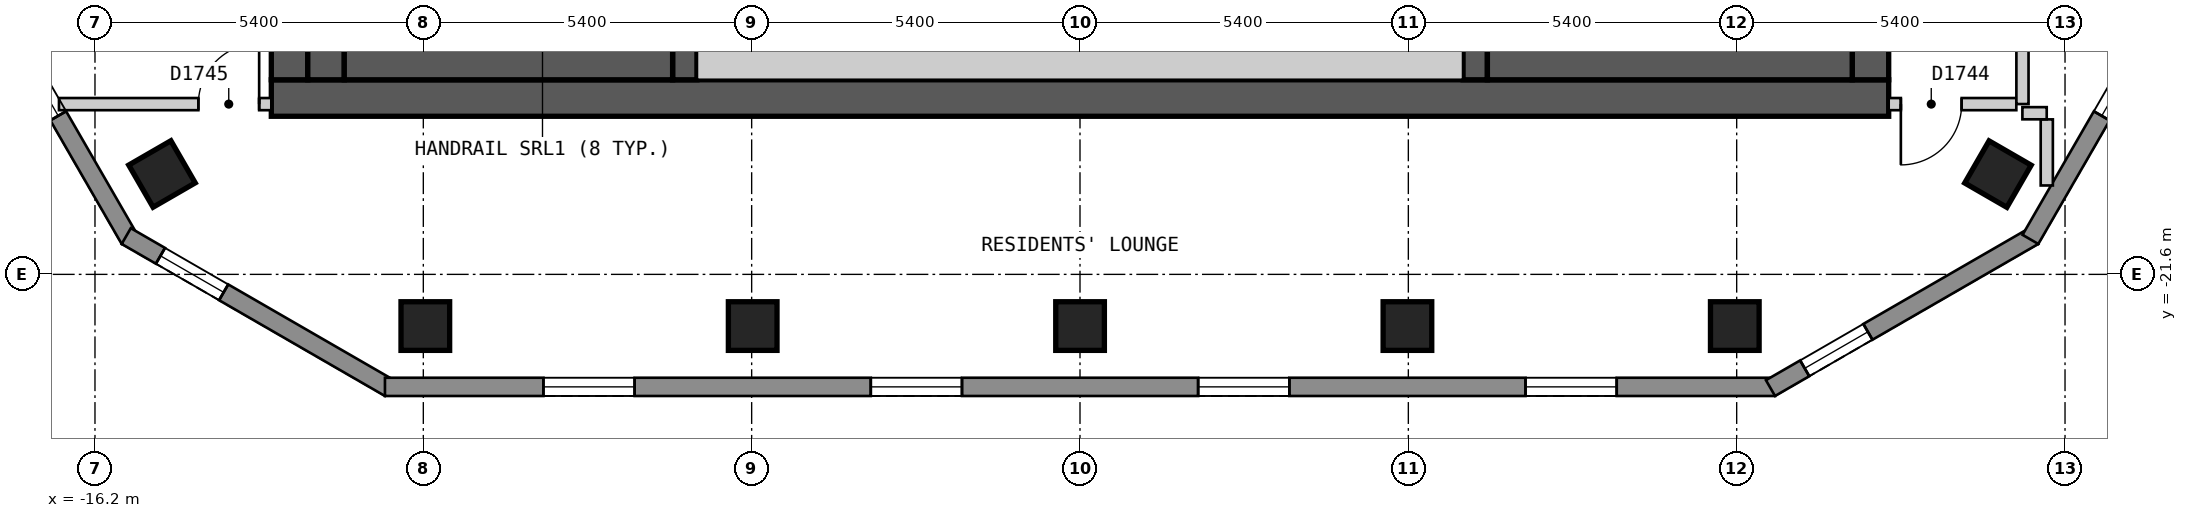
"""IFC4 building model, lengths in metres.
Left out: names, types, materials, properties, quantities, classifications, styles, units other than length and angle.
Written with IfcOpenShell. Run it as: python <this file> out.ifc"""

import sys

from ifc_helpers import new_model, si_unit, direction, frame, frame_2d, origin, origin_2d, place, context, subcontext, project, spatial, polyline, rectangle, outline, extrude, element, fill, save


model = new_model("IFC4")
c1 = context("Model", 3, precision=1e-05, world=origin(), true_north=direction((0.0, 1.0)))
c2 = subcontext(c1, "Body", "Model", "MODEL_VIEW")
j1 = project(units=[si_unit("LENGTHUNIT", "METRE"), si_unit("PLANEANGLEUNIT", "RADIAN")], contexts=[c1])
p1 = place(None, origin())
s1 = spatial("IfcSite", under=j1, at=p1, CompositionType="ELEMENT")
p2 = place(p1, origin())
s2 = spatial("IfcBuilding", under=s1, at=p2, CompositionType="ELEMENT")
p3 = place(p2, frame((0.0, 0.0, 181.2)))
s3 = spatial("IfcBuildingStorey", under=s2, at=p3, CompositionType="ELEMENT", Elevation=181.2)
for number, where, z_axis, x_axis in (
    (1, (-15.098, -19.949, 0.0), (0.0, 0.0, 1.0), (0.5, -0.866, 0.0)),
    (2, (-10.767, -22.45, 0.0), (0.0, 0.0, 1.0), (1.0, 0.0, 0.0)),
    (3, (-5.383, -22.45, 0.0), (0.0, 0.0, 1.0), (1.0, 0.0, 0.0)),
    (4, (0.001, -22.45, 0.0), (0.0, 0.0, 1.0), (1.0, 0.0, 0.0)),
    (5, (5.385, -22.45, 0.0), (0.0, 0.0, 1.0), (1.0, 0.0, 0.0)),
    (6, (10.769, -22.45, 0.0), (0.0, 0.0, 1.0), (1.0, 0.0, 0.0)),
    (7, (15.097, -19.951, 0.0), (0.0, 0.0, 1.0), (0.5, 0.866, 0.0)),
):
    element("IfcColumn", number, at=place(p3, frame(where, z_axis=z_axis, x_axis=x_axis)), inside=s3, PredefinedType="COLUMN", context=c2, shape_type="SweptSolid", body=[
        extrude(rectangle(XDim=0.8, YDim=0.8, at=origin_2d()), origin(), (0.0, 0.0, 1.0), 3.0),
    ])
p4 = place(p3, frame((-13.3, -18.7, 0.0), z_axis=(0.0, 0.0, 1.0), x_axis=(1.0, 0.0, 0.0)))
e8 = element("IfcWall", 8, at=p4, inside=s3, PredefinedType="SHEAR", context=c2, shape_type="SweptSolid", body=[
    extrude(rectangle(XDim=26.6, YDim=0.6, at=frame_2d((13.3, 0.0))), origin(), (0.0, 0.0, 1.0), 2.7),
])
p5 = place(p3, frame((-13.0, -18.4, 0.0), z_axis=(0.0, 0.0, 1.0), x_axis=(0.0, 1.0, 0.0)))
e9 = element("IfcWall", 9, at=p5, inside=s3, PredefinedType="SHEAR", context=c2, shape_type="SweptSolid", body=[
    extrude(rectangle(XDim=12.8, YDim=0.6, at=frame_2d((6.4, 0.0))), origin(), (0.0, 0.0, 1.0), 2.7),
])
p6 = place(p5, frame((4.2, 0.0, 0.0)))
e10 = element("IfcOpeningElement", 10, at=p6, cuts=e9, PredefinedType="OPENING", context=c2, shape_type="SweptSolid", body=[
    extrude(rectangle(XDim=1.2, YDim=2.1, at=frame_2d((0.6, 1.05))), frame((0.0, 0.31, 0.0), z_axis=(0.0, -1.0, 0.0), x_axis=(1.0, 0.0, 0.0)), (0.0, 0.0, 1.0), 0.62),
])
p7 = place(p3, frame((13.0, -18.4, 0.0), z_axis=(0.0, 0.0, 1.0), x_axis=(0.0, 1.0, 0.0)))
e11 = element("IfcWall", 11, at=p7, inside=s3, PredefinedType="SHEAR", context=c2, shape_type="SweptSolid", body=[
    extrude(rectangle(XDim=12.8, YDim=0.6, at=frame_2d((6.4, 0.0))), origin(), (0.0, 0.0, 1.0), 2.7),
])
for number, where, z_axis, x_axis in (
    (12, (-6.5, -18.4, 0.0), (0.0, 0.0, 1.0), (0.0, 1.0, 0.0)),
    (13, (6.5, -18.4, 0.0), (0.0, 0.0, 1.0), (0.0, 1.0, 0.0)),
):
    element("IfcWall", number, at=place(p3, frame(where, z_axis=z_axis, x_axis=x_axis)), inside=s3, PredefinedType="SHEAR", context=c2, shape_type="SweptSolid", body=[
        extrude(rectangle(XDim=3.55, YDim=0.4, at=frame_2d((1.775, 0.0))), origin(), (0.0, 0.0, 1.0), 2.7),
    ])
p8 = place(p3, frame((-26.024, -3.025, 0.0), z_axis=(0.0, 0.0, 1.0), x_axis=(0.500018670445, -0.86601462413, 0.0)))
e14 = element("IfcWall", 14, at=p8, inside=s3, PredefinedType="SOLIDWALL", context=c2, shape_type="SweptSolid", body=[
    extrude(outline(polyline([(0.0, -0.15), (20.785, -0.15), (20.705, 0.15), (0.08, 0.15), (0.0, -0.15)])), origin(), (0.0, 0.0, 1.0), 2.7),
])
p9 = place(p8, frame((2.346, 0.0, 0.15)))
e15 = element("IfcOpeningElement", 15, at=p9, cuts=e14, PredefinedType="OPENING", context=c2, shape_type="SweptSolid", body=[
    extrude(rectangle(XDim=1.5, YDim=2.1, at=frame_2d((0.75, 1.05))), frame((0.0, 0.16, 0.0), z_axis=(0.0, -1.0, 0.0), x_axis=(1.0, 0.0, 0.0)), (0.0, 0.0, 1.0), 0.32),
])
p10 = place(p8, frame((7.21, 0.0, 0.15)))
e16 = element("IfcOpeningElement", 16, at=p10, cuts=e14, PredefinedType="OPENING", context=c2, shape_type="SweptSolid", body=[
    extrude(rectangle(XDim=1.5, YDim=2.1, at=frame_2d((0.75, 1.05))), frame((0.0, 0.16, 0.0), z_axis=(0.0, -1.0, 0.0), x_axis=(1.0, 0.0, 0.0)), (0.0, 0.0, 1.0), 0.32),
])
p11 = place(p8, frame((12.073, 0.0, 0.15)))
e17 = element("IfcOpeningElement", 17, at=p11, cuts=e14, PredefinedType="OPENING", context=c2, shape_type="SweptSolid", body=[
    extrude(rectangle(XDim=1.5, YDim=2.1, at=frame_2d((0.75, 1.05))), frame((0.0, 0.16, 0.0), z_axis=(0.0, -1.0, 0.0), x_axis=(1.0, 0.0, 0.0)), (0.0, 0.0, 1.0), 0.32),
])
p12 = place(p8, frame((16.938, 0.0, 0.15)))
e18 = element("IfcOpeningElement", 18, at=p12, cuts=e14, PredefinedType="OPENING", context=c2, shape_type="SweptSolid", body=[
    extrude(rectangle(XDim=1.5, YDim=2.1, at=frame_2d((0.75, 1.05))), frame((0.0, 0.16, 0.0), z_axis=(0.0, -1.0, 0.0), x_axis=(1.0, 0.0, 0.0)), (0.0, 0.0, 1.0), 0.32),
])
p13 = place(p3, frame((-15.686, -20.97, 0.0), z_axis=(0.0, 0.0, 1.0), x_axis=(0.866022959057, -0.500004234368, 0.0)))
e19 = element("IfcWall", 19, at=p13, inside=s3, PredefinedType="SOLIDWALL", context=c2, shape_type="SweptSolid", body=[
    extrude(outline(polyline([(0.0, -0.15), (5.0, -0.15), (4.92, 0.15), (0.08, 0.15), (0.0, -0.15)])), origin(), (0.0, 0.0, 1.0), 2.7),
])
p14 = place(p13, frame((0.65, 0.0, 0.15)))
e20 = element("IfcOpeningElement", 20, at=p14, cuts=e19, PredefinedType="OPENING", context=c2, shape_type="SweptSolid", body=[
    extrude(rectangle(XDim=1.2, YDim=2.1, at=frame_2d((0.6, 1.05))), frame((0.0, 0.16, 0.0), z_axis=(0.0, -1.0, 0.0), x_axis=(1.0, 0.0, 0.0)), (0.0, 0.0, 1.0), 0.32),
])
p15 = place(p3, frame((-11.431, -23.45, 0.0), z_axis=(0.0, 0.0, 1.0), x_axis=(1.0, 0.0, 0.0)))
e21 = element("IfcWall", 21, at=p15, inside=s3, PredefinedType="SOLIDWALL", context=c2, shape_type="SweptSolid", body=[
    extrude(outline(polyline([(0.0, -0.15), (22.862, -0.15), (22.781, 0.15), (0.08, 0.15), (0.0, -0.15)])), origin(), (0.0, 0.0, 1.0), 2.7),
])
p16 = place(p15, frame((2.606, 0.0, 0.15)))
e22 = element("IfcOpeningElement", 22, at=p16, cuts=e21, PredefinedType="OPENING", context=c2, shape_type="SweptSolid", body=[
    extrude(rectangle(XDim=1.5, YDim=2.1, at=frame_2d((0.75, 1.05))), frame((0.0, 0.16, 0.0), z_axis=(0.0, -1.0, 0.0), x_axis=(1.0, 0.0, 0.0)), (0.0, 0.0, 1.0), 0.32),
])
p17 = place(p15, frame((7.99, 0.0, 0.15)))
e23 = element("IfcOpeningElement", 23, at=p17, cuts=e21, PredefinedType="OPENING", context=c2, shape_type="SweptSolid", body=[
    extrude(rectangle(XDim=1.5, YDim=2.1, at=frame_2d((0.75, 1.05))), frame((0.0, 0.16, 0.0), z_axis=(0.0, -1.0, 0.0), x_axis=(1.0, 0.0, 0.0)), (0.0, 0.0, 1.0), 0.32),
])
p18 = place(p15, frame((13.374, 0.0, 0.15)))
e24 = element("IfcOpeningElement", 24, at=p18, cuts=e21, PredefinedType="OPENING", context=c2, shape_type="SweptSolid", body=[
    extrude(rectangle(XDim=1.5, YDim=2.1, at=frame_2d((0.75, 1.05))), frame((0.0, 0.16, 0.0), z_axis=(0.0, -1.0, 0.0), x_axis=(1.0, 0.0, 0.0)), (0.0, 0.0, 1.0), 0.32),
])
p19 = place(p15, frame((18.758, 0.0, 0.15)))
e25 = element("IfcOpeningElement", 25, at=p19, cuts=e21, PredefinedType="OPENING", context=c2, shape_type="SweptSolid", body=[
    extrude(rectangle(XDim=1.5, YDim=2.1, at=frame_2d((0.75, 1.05))), frame((0.0, 0.16, 0.0), z_axis=(0.0, -1.0, 0.0), x_axis=(1.0, 0.0, 0.0)), (0.0, 0.0, 1.0), 0.32),
])
p20 = place(p3, frame((11.356, -23.47, 0.0), z_axis=(0.0, 0.0, 1.0), x_axis=(0.866022959057, 0.500004234368, 0.0)))
e26 = element("IfcWall", 26, at=p20, inside=s3, PredefinedType="SOLIDWALL", context=c2, shape_type="SweptSolid", body=[
    extrude(outline(polyline([(0.0, -0.15), (5.0, -0.15), (4.92, 0.15), (0.08, 0.15), (0.0, -0.15)])), origin(), (0.0, 0.0, 1.0), 2.7),
])
p21 = place(p20, frame((0.65, 0.0, 0.15)))
e27 = element("IfcOpeningElement", 27, at=p21, cuts=e26, PredefinedType="OPENING", context=c2, shape_type="SweptSolid", body=[
    extrude(rectangle(XDim=1.2, YDim=2.1, at=frame_2d((0.6, 1.05))), frame((0.0, 0.16, 0.0), z_axis=(0.0, -1.0, 0.0), x_axis=(1.0, 0.0, 0.0)), (0.0, 0.0, 1.0), 0.32),
])
p22 = place(p3, frame((15.631, -21.025, 0.0), z_axis=(0.0, 0.0, 1.0), x_axis=(0.500018670445, 0.86601462413, 0.0)))
e28 = element("IfcWall", 28, at=p22, inside=s3, PredefinedType="SOLIDWALL", context=c2, shape_type="SweptSolid", body=[
    extrude(outline(polyline([(0.0, -0.15), (20.785, -0.15), (20.705, 0.15), (0.08, 0.15), (0.0, -0.15)])), origin(), (0.0, 0.0, 1.0), 2.7),
])
p23 = place(p22, frame((2.346, 0.0, 0.15)))
e29 = element("IfcOpeningElement", 29, at=p23, cuts=e28, PredefinedType="OPENING", context=c2, shape_type="SweptSolid", body=[
    extrude(rectangle(XDim=1.5, YDim=2.1, at=frame_2d((0.75, 1.05))), frame((0.0, 0.16, 0.0), z_axis=(0.0, -1.0, 0.0), x_axis=(1.0, 0.0, 0.0)), (0.0, 0.0, 1.0), 0.32),
])
p24 = place(p22, frame((7.21, 0.0, 0.15)))
e30 = element("IfcOpeningElement", 30, at=p24, cuts=e28, PredefinedType="OPENING", context=c2, shape_type="SweptSolid", body=[
    extrude(rectangle(XDim=1.5, YDim=2.1, at=frame_2d((0.75, 1.05))), frame((0.0, 0.16, 0.0), z_axis=(0.0, -1.0, 0.0), x_axis=(1.0, 0.0, 0.0)), (0.0, 0.0, 1.0), 0.32),
])
p25 = place(p22, frame((12.073, 0.0, 0.15)))
e31 = element("IfcOpeningElement", 31, at=p25, cuts=e28, PredefinedType="OPENING", context=c2, shape_type="SweptSolid", body=[
    extrude(rectangle(XDim=1.5, YDim=2.1, at=frame_2d((0.75, 1.05))), frame((0.0, 0.16, 0.0), z_axis=(0.0, -1.0, 0.0), x_axis=(1.0, 0.0, 0.0)), (0.0, 0.0, 1.0), 0.32),
])
p26 = place(p22, frame((16.938, 0.0, 0.15)))
e32 = element("IfcOpeningElement", 32, at=p26, cuts=e28, PredefinedType="OPENING", context=c2, shape_type="SweptSolid", body=[
    extrude(rectangle(XDim=1.5, YDim=2.1, at=frame_2d((0.75, 1.05))), frame((0.0, 0.16, 0.0), z_axis=(0.0, -1.0, 0.0), x_axis=(1.0, 0.0, 0.0)), (0.0, 0.0, 1.0), 0.32),
])
p27 = place(p3, frame((13.3, -18.8, 0.0), z_axis=(0.0, 0.0, 1.0), x_axis=(1.0, 0.0, 0.0)))
e33 = element("IfcWall", 33, at=p27, inside=s3, PredefinedType="PARTITIONING", context=c2, shape_type="SweptSolid", body=[
    extrude(rectangle(XDim=2.099, YDim=0.2, at=frame_2d((1.049, 0.0))), origin(), (0.0, 0.0, 1.0), 2.7),
])
p28 = place(p27, frame((0.2, 0.0, 0.0)))
e34 = element("IfcOpeningElement", 34, at=p28, cuts=e33, PredefinedType="OPENING", context=c2, shape_type="SweptSolid", body=[
    extrude(rectangle(XDim=1.0, YDim=2.1, at=frame_2d((0.5, 1.05))), frame((0.0, 0.11, 0.0), z_axis=(0.0, -1.0, 0.0), x_axis=(1.0, 0.0, 0.0)), (0.0, 0.0, 1.0), 0.22),
])
p29 = place(p3, frame((15.5, -18.799, 0.0), z_axis=(0.0, 0.0, 1.0), x_axis=(0.0, 1.0, 0.0)))
e35 = element("IfcWall", 35, at=p29, inside=s3, PredefinedType="PARTITIONING", context=c2, shape_type="SweptSolid", body=[
    extrude(rectangle(XDim=15.349, YDim=0.2, at=frame_2d((7.675, 0.0))), origin(), (0.0, 0.0, 1.0), 2.7),
])
p30 = place(p29, frame((11.348, 0.0, 0.0)))
e36 = element("IfcOpeningElement", 36, at=p30, cuts=e35, PredefinedType="OPENING", context=c2, shape_type="SweptSolid", body=[
    extrude(rectangle(XDim=1.0, YDim=2.1, at=frame_2d((0.5, 1.05))), frame((0.0, 0.11, 0.0), z_axis=(0.0, -1.0, 0.0), x_axis=(1.0, 0.0, 0.0)), (0.0, 0.0, 1.0), 0.22),
])
p31 = place(p3, frame((15.9, -19.051, 0.0), z_axis=(0.0, 0.0, 1.0), x_axis=(0.0, -1.0, 0.0)))
e37 = element("IfcWall", 37, at=p31, inside=s3, PredefinedType="PARTITIONING", context=c2, shape_type="SweptSolid", body=[
    extrude(rectangle(XDim=1.087, YDim=0.2, at=frame_2d((0.543, 0.0))), origin(), (0.0, 0.0, 1.0), 2.7),
])
p32 = place(p3, frame((15.499, -18.95, 0.0), z_axis=(0.0, 0.0, 1.0), x_axis=(1.0, 0.0, 0.0)))
e38 = element("IfcWall", 38, at=p32, inside=s3, PredefinedType="PARTITIONING", context=c2, shape_type="SweptSolid", body=[
    extrude(rectangle(XDim=0.4, YDim=0.2, at=frame_2d((0.2, 0.0))), origin(), (0.0, 0.0, 1.0), 2.7),
])
p33 = place(p3, frame((-16.792, -18.8, 0.0), z_axis=(0.0, 0.0, 1.0), x_axis=(1.0, 0.0, 0.0)))
e39 = element("IfcWall", 39, at=p33, inside=s3, PredefinedType="PARTITIONING", context=c2, shape_type="SweptSolid", body=[
    extrude(rectangle(XDim=3.492, YDim=0.2, at=frame_2d((1.746, 0.0))), origin(), (0.0, 0.0, 1.0), 2.7),
])
p34 = place(p33, frame((2.292, 0.0, 0.0)))
e40 = element("IfcOpeningElement", 40, at=p34, cuts=e39, PredefinedType="OPENING", context=c2, shape_type="SweptSolid", body=[
    extrude(rectangle(XDim=1.0, YDim=2.1, at=frame_2d((0.5, 1.05))), frame((0.0, 0.11, 0.0), z_axis=(0.0, -1.0, 0.0), x_axis=(1.0, 0.0, 0.0)), (0.0, 0.0, 1.0), 0.22),
])
p35 = place(p3, frame((-12.4, -18.4, 0.0), z_axis=(0.0, 0.0, 1.0), x_axis=(0.0, 1.0, 0.0)))
e41 = element("IfcWall", 41, at=p35, inside=s3, PredefinedType="SOLIDWALL", context=c2, shape_type="SweptSolid", body=[
    extrude(rectangle(XDim=3.55, YDim=0.6, at=frame_2d((1.775, 0.0))), origin(), (0.0, 0.0, 1.0), 2.7),
])
p36 = place(p3, frame((-12.1, -18.1, 0.0), z_axis=(0.0, 0.0, 1.0), x_axis=(1.0, 0.0, 0.0)))
e42 = element("IfcWall", 42, at=p36, inside=s3, PredefinedType="SOLIDWALL", context=c2, shape_type="SweptSolid", body=[
    extrude(rectangle(XDim=5.4, YDim=0.6, at=frame_2d((2.7, 0.0))), origin(), (0.0, 0.0, 1.0), 2.7),
])
p37 = place(p3, frame((-6.3, -18.1, 0.0), z_axis=(0.0, 0.0, 1.0), x_axis=(1.0, 0.0, 0.0)))
e43 = element("IfcWall", 43, at=p37, inside=s3, PredefinedType="PARTITIONING", context=c2, shape_type="SweptSolid", body=[
    extrude(rectangle(XDim=12.6, YDim=0.6, at=frame_2d((6.3, 0.0))), origin(), (0.0, 0.0, 1.0), 2.7),
])
p38 = place(p3, frame((6.7, -18.0, 0.0), z_axis=(0.0, 0.0, 1.0), x_axis=(1.0, 0.0, 0.0)))
e44 = element("IfcWall", 44, at=p38, inside=s3, PredefinedType="SOLIDWALL", context=c2, shape_type="SweptSolid", body=[
    extrude(rectangle(XDim=6.0, YDim=0.8, at=frame_2d((3.0, 0.0))), origin(), (0.0, 0.0, 1.0), 2.7),
])
p39 = place(p12, origin())
e45 = element("IfcWindow", 45, at=p39, inside=s3, PartitioningType="SINGLE_PANEL", PredefinedType="WINDOW", context=c2, shape_type="SweptSolid", body=[
    extrude(rectangle(XDim=1.5, YDim=2.1, at=frame_2d((0.75, 1.05))), frame((0.0, 0.03, 0.0), z_axis=(0.0, -1.0, 0.0), x_axis=(1.0, 0.0, 0.0)), (0.0, 0.0, 1.0), 0.06),
])
fill(e18, e45)
p40 = place(p14, origin())
e46 = element("IfcWindow", 46, at=p40, inside=s3, PartitioningType="SINGLE_PANEL", PredefinedType="WINDOW", context=c2, shape_type="SweptSolid", body=[
    extrude(rectangle(XDim=1.2, YDim=2.1, at=frame_2d((0.6, 1.05))), frame((0.0, 0.03, 0.0), z_axis=(0.0, -1.0, 0.0), x_axis=(1.0, 0.0, 0.0)), (0.0, 0.0, 1.0), 0.06),
])
fill(e20, e46)
p41 = place(p16, origin())
e47 = element("IfcWindow", 47, at=p41, inside=s3, PartitioningType="SINGLE_PANEL", PredefinedType="WINDOW", context=c2, shape_type="SweptSolid", body=[
    extrude(rectangle(XDim=1.5, YDim=2.1, at=frame_2d((0.75, 1.05))), frame((0.0, 0.03, 0.0), z_axis=(0.0, -1.0, 0.0), x_axis=(1.0, 0.0, 0.0)), (0.0, 0.0, 1.0), 0.06),
])
fill(e22, e47)
p42 = place(p17, origin())
e48 = element("IfcWindow", 48, at=p42, inside=s3, PartitioningType="SINGLE_PANEL", PredefinedType="WINDOW", context=c2, shape_type="SweptSolid", body=[
    extrude(rectangle(XDim=1.5, YDim=2.1, at=frame_2d((0.75, 1.05))), frame((0.0, 0.03, 0.0), z_axis=(0.0, -1.0, 0.0), x_axis=(1.0, 0.0, 0.0)), (0.0, 0.0, 1.0), 0.06),
])
fill(e23, e48)
p43 = place(p18, origin())
e49 = element("IfcWindow", 49, at=p43, inside=s3, PartitioningType="SINGLE_PANEL", PredefinedType="WINDOW", context=c2, shape_type="SweptSolid", body=[
    extrude(rectangle(XDim=1.5, YDim=2.1, at=frame_2d((0.75, 1.05))), frame((0.0, 0.03, 0.0), z_axis=(0.0, -1.0, 0.0), x_axis=(1.0, 0.0, 0.0)), (0.0, 0.0, 1.0), 0.06),
])
fill(e24, e49)
p44 = place(p19, origin())
e50 = element("IfcWindow", 50, at=p44, inside=s3, PartitioningType="SINGLE_PANEL", PredefinedType="WINDOW", context=c2, shape_type="SweptSolid", body=[
    extrude(rectangle(XDim=1.5, YDim=2.1, at=frame_2d((0.75, 1.05))), frame((0.0, 0.03, 0.0), z_axis=(0.0, -1.0, 0.0), x_axis=(1.0, 0.0, 0.0)), (0.0, 0.0, 1.0), 0.06),
])
fill(e25, e50)
p45 = place(p21, origin())
e51 = element("IfcWindow", 51, at=p45, inside=s3, PartitioningType="SINGLE_PANEL", PredefinedType="WINDOW", context=c2, shape_type="SweptSolid", body=[
    extrude(rectangle(XDim=1.2, YDim=2.1, at=frame_2d((0.6, 1.05))), frame((0.0, 0.03, 0.0), z_axis=(0.0, -1.0, 0.0), x_axis=(1.0, 0.0, 0.0)), (0.0, 0.0, 1.0), 0.06),
])
fill(e27, e51)
p46 = place(p23, origin())
e52 = element("IfcWindow", 52, at=p46, inside=s3, PartitioningType="SINGLE_PANEL", PredefinedType="WINDOW", context=c2, shape_type="SweptSolid", body=[
    extrude(rectangle(XDim=1.5, YDim=2.1, at=frame_2d((0.75, 1.05))), frame((0.0, 0.03, 0.0), z_axis=(0.0, -1.0, 0.0), x_axis=(1.0, 0.0, 0.0)), (0.0, 0.0, 1.0), 0.06),
])
fill(e29, e52)
p47 = place(p28, origin())
e53 = element("IfcDoor", 53, at=p47, inside=s3, OperationType="SINGLE_SWING_LEFT", PredefinedType="DOOR", context=c2, shape_type="SweptSolid", body=[
    extrude(rectangle(XDim=1.0, YDim=2.1, at=frame_2d((0.5, 1.05))), frame((0.0, 0.025, 0.0), z_axis=(0.0, -1.0, 0.0), x_axis=(1.0, 0.0, 0.0)), (0.0, 0.0, 1.0), 0.05),
])
fill(e34, e53)
p48 = place(p34, origin())
e54 = element("IfcDoor", 54, at=p48, inside=s3, OperationType="SINGLE_SWING_RIGHT", PredefinedType="DOOR", context=c2, shape_type="SweptSolid", body=[
    extrude(rectangle(XDim=1.0, YDim=2.1, at=frame_2d((0.5, 1.05))), frame((0.0, 0.025, 0.0), z_axis=(0.0, -1.0, 0.0), x_axis=(1.0, 0.0, 0.0)), (0.0, 0.0, 1.0), 0.05),
])
fill(e40, e54)
save(model, sys.argv[1])
